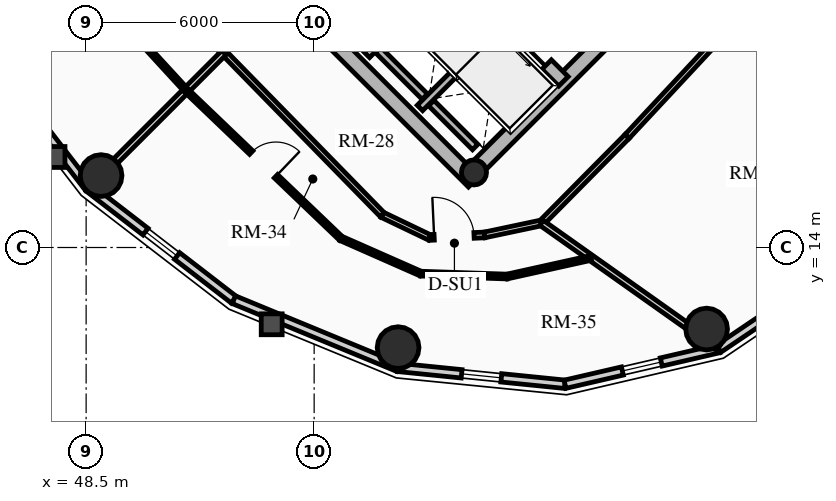
"""IFC4 building model, lengths in metres.
Left out: names, types, materials, properties, quantities, classifications, styles, units other than length and angle.
Written with IfcOpenShell. Run it as: python <this file> out.ifc"""

import sys

from ifc_helpers import new_model, si_unit, direction, frame, frame_2d, origin, origin_2d, place, context, subcontext, project, spatial, rectangle, circle, hollow_circle, extrude, source, transform, mapped, element, fill, save


model = new_model("IFC4")
c1 = context("Model", 3, precision=1e-05, world=origin(), true_north=direction((0.0, 1.0)))
c2 = subcontext(c1, "Body", "Model", "MODEL_VIEW")
j1 = project(units=[si_unit("LENGTHUNIT", "METRE"), si_unit("PLANEANGLEUNIT", "RADIAN")], contexts=[c1])
p1 = place(None, origin())
s1 = spatial("IfcSite", under=j1, at=p1, CompositionType="ELEMENT")
p2 = place(p1, origin())
s2 = spatial("IfcBuilding", under=s1, at=p2, CompositionType="ELEMENT")
p3 = place(p2, frame((0.0, 0.0, 222.85)))
s3 = spatial("IfcBuildingStorey", under=s2, at=p3, CompositionType="ELEMENT", Elevation=222.85)
p4 = place(p3, frame((58.702, 15.732, 0.0), z_axis=(0.0, 0.0, 1.0), x_axis=(-0.707106781187, 0.707106781187, 0.0)))
e1 = element("IfcWall", 1, at=p4, inside=s3, PredefinedType="SHEAR", context=c2, shape_type="SweptSolid", body=[
    extrude(rectangle(XDim=14.1, YDim=0.4, at=frame_2d((7.05, 0.0))), origin(), (0.0, 0.0, 1.0), 3.2),
])
p5 = place(p3, frame((58.561, 15.873, 0.0), z_axis=(0.0, 0.0, 1.0), x_axis=(0.707106781187, 0.707106781187, 0.0)))
e2 = element("IfcWall", 2, at=p5, inside=s3, PredefinedType="SHEAR", context=c2, shape_type="SweptSolid", body=[
    extrude(rectangle(XDim=10.7, YDim=0.4, at=frame_2d((5.35, 0.0))), origin(), (0.0, 0.0, 1.0), 3.2),
])
m1 = source(origin(), c2, "Body", "SweptSolid", [
    extrude(rectangle(XDim=1.5, YDim=2.02, at=frame_2d((0.75, 1.01))), frame((0.0, 0.21, 0.0), z_axis=(0.0, -1.0, 0.0), x_axis=(1.0, 0.0, 0.0)), (0.0, 0.0, 1.0), 0.42),
])
p6 = place(p5, frame((5.45, 0.0, 0.0)))
e3 = element("IfcOpeningElement", 3, at=p6, cuts=e2, PredefinedType="OPENING", context=c2, shape_type="MappedRepresentation", body=[
    mapped(m1, transform((0.0, 0.0, 0.0), x_axis=(1.0, 0.0, 0.0), y_axis=(0.0, 1.0, 0.0), z_axis=(0.0, 0.0, 1.0), scale=1.0)),
])
p7 = place(p3, frame((61.06, 18.373, 0.0), z_axis=(0.0, 0.0, 1.0), x_axis=(-0.707106781187, 0.707106781187, 0.0)))
e4 = element("IfcWall", 4, at=p7, inside=s3, PredefinedType="SHEAR", context=c2, shape_type="SweptSolid", body=[
    extrude(rectangle(XDim=13.7, YDim=0.35, at=frame_2d((6.85, 0.0))), origin(), (0.0, 0.0, 1.0), 3.2),
])
m2 = source(origin(), c2, "Body", "SweptSolid", [
    extrude(rectangle(XDim=1.1, YDim=2.015, at=frame_2d((0.55, 1.007))), frame((0.0, 0.185, 0.0), z_axis=(0.0, -1.0, 0.0), x_axis=(1.0, 0.0, 0.0)), (0.0, 0.0, 1.0), 0.37),
])
p8 = place(p7, frame((4.85, 0.0, 0.0)))
e5 = element("IfcOpeningElement", 5, at=p8, cuts=e4, PredefinedType="OPENING", context=c2, shape_type="MappedRepresentation", body=[
    mapped(m2, transform((0.0, 0.0, 0.0), x_axis=(1.0, 0.0, 0.0), y_axis=(0.0, 1.0, 0.0), z_axis=(0.0, 0.0, 1.0), scale=1.0)),
])
p9 = place(p7, frame((0.625, 0.0, 0.0)))
e6 = element("IfcOpeningElement", 6, at=p9, cuts=e4, PredefinedType="OPENING", context=c2, shape_type="MappedRepresentation", body=[
    mapped(m2, transform((0.0, 0.0, 0.0), x_axis=(1.0, 0.0, 0.0), y_axis=(0.0, 1.0, 0.0), z_axis=(0.0, 0.0, 1.0), scale=1.0)),
])
p10 = place(p7, frame((2.625, 0.0, 0.0)))
e7 = element("IfcOpeningElement", 7, at=p10, cuts=e4, PredefinedType="OPENING", context=c2, shape_type="MappedRepresentation", body=[
    mapped(m2, transform((0.0, 0.0, 0.0), x_axis=(1.0, 0.0, 0.0), y_axis=(0.0, 1.0, 0.0), z_axis=(0.0, 0.0, 1.0), scale=1.0)),
])
m3 = source(origin(), c2, "Body", "SweptSolid", [
    extrude(rectangle(XDim=1.15, YDim=2.02, at=frame_2d((0.575, 1.01))), frame((0.0, 0.185, 0.0), z_axis=(0.0, -1.0, 0.0), x_axis=(1.0, 0.0, 0.0)), (0.0, 0.0, 1.0), 0.37),
])
p11 = place(p7, frame((7.27, 0.0, 0.0)))
e8 = element("IfcOpeningElement", 8, at=p11, cuts=e4, PredefinedType="OPENING", context=c2, shape_type="MappedRepresentation", body=[
    mapped(m3, transform((0.0, 0.0, 0.0), x_axis=(1.0, 0.0, 0.0), y_axis=(0.0, 1.0, 0.0), z_axis=(0.0, 0.0, 1.0), scale=1.0)),
])
p12 = place(p3, frame((58.706, 15.976, 0.0), z_axis=(0.0, 0.0, 1.0), x_axis=(0.707106781187, 0.707106781187, 0.0)))
e9 = element("IfcColumn", 9, at=p12, inside=s3, PredefinedType="COLUMN", context=c2, shape_type="SweptSolid", body=[
    extrude(hollow_circle(Radius=0.33, WallThickness=0.025, at=origin_2d()), origin(), (0.0, 0.0, 1.0), 3.2),
])
for number, where, z_axis, x_axis in (
    (10, (48.893, 15.893, 0.0), (0.0, 0.0, 1.0), (1.0, 0.0, 0.0)),
    (11, (56.709, 11.365, 0.0), (0.0, 0.0, 1.0), (1.0, 0.0, 0.0)),
    (12, (64.827, 11.854, 0.0), (0.0, 0.0, 1.0), (1.0, 0.0, 0.0)),
):
    element("IfcColumn", number, at=place(p3, frame(where, z_axis=z_axis, x_axis=x_axis)), inside=s3, PredefinedType="USERDEFINED", context=c2, shape_type="SweptSolid", body=[
        extrude(circle(Radius=0.55, at=origin_2d()), origin(), (0.0, 0.0, 1.0), 3.2),
    ])
p13 = place(p3, frame((48.569, 15.569, 0.0), z_axis=(0.0, 0.0, 1.0), x_axis=(-0.610523083886, 0.791998462147, 0.0)))
e13 = element("IfcWall", 13, at=p13, inside=s3, PredefinedType="SOLIDWALL", context=c2, shape_type="SweptSolid", body=[
    extrude(rectangle(XDim=4.82, YDim=0.22, at=frame_2d((2.41, 0.0))), origin(), (0.0, 0.0, 1.0), 2.612),
])
p14 = place(p3, frame((52.387, 12.626, 0.0), z_axis=(0.0, 0.0, 1.0), x_axis=(-0.791998462147, 0.610523083886, 0.0)))
e14 = element("IfcWall", 14, at=p14, inside=s3, PredefinedType="SOLIDWALL", context=c2, shape_type="SweptSolid", body=[
    extrude(rectangle(XDim=4.82, YDim=0.22, at=frame_2d((2.41, 0.0))), origin(), (0.0, 0.0, 1.0), 2.612),
])
m4 = source(origin(), c2, "Body", "SweptSolid", [
    extrude(rectangle(XDim=1.05, YDim=1.3, at=frame_2d((0.525, 0.65))), frame((0.0, 0.12, 0.0), z_axis=(0.0, -1.0, 0.0), x_axis=(1.0, 0.0, 0.0)), (0.0, 0.0, 1.0), 0.24),
])
p15 = place(p14, frame((1.885, 0.0, 0.65)))
e15 = element("IfcOpeningElement", 15, at=p15, cuts=e14, PredefinedType="OPENING", context=c2, shape_type="MappedRepresentation", body=[
    mapped(m4, transform((0.0, 0.0, 0.0), x_axis=(1.0, 0.0, 0.0), y_axis=(0.0, 1.0, 0.0), z_axis=(0.0, 0.0, 1.0), scale=1.0)),
])
p16 = place(p3, frame((56.705, 10.845, 0.0), z_axis=(0.0, 0.0, 1.0), x_axis=(-0.924447353237, 0.381309704956, 0.0)))
e16 = element("IfcWall", 16, at=p16, inside=s3, PredefinedType="SOLIDWALL", context=c2, shape_type="SweptSolid", body=[
    extrude(rectangle(XDim=4.671, YDim=0.22, at=frame_2d((2.335, 0.0))), origin(), (0.0, 0.0, 1.0), 2.612),
])
p17 = place(p3, frame((61.1, 10.401, 0.0), z_axis=(0.0, 0.0, 1.0), x_axis=(-0.994929930991, 0.100570534541, 0.0)))
e17 = element("IfcWall", 17, at=p17, inside=s3, PredefinedType="SOLIDWALL", context=c2, shape_type="SweptSolid", body=[
    extrude(rectangle(XDim=4.418, YDim=0.22, at=frame_2d((2.209, 0.0))), origin(), (0.0, 0.0, 1.0), 2.612),
])
p18 = place(p17, frame((1.684, 0.0, 0.65)))
e18 = element("IfcOpeningElement", 18, at=p18, cuts=e17, PredefinedType="OPENING", context=c2, shape_type="MappedRepresentation", body=[
    mapped(m4, transform((0.0, 0.0, 0.0), x_axis=(1.0, 0.0, 0.0), y_axis=(0.0, 1.0, 0.0), z_axis=(0.0, 0.0, 1.0), scale=1.0)),
])
p19 = place(p3, frame((65.144, 11.337, 0.0), z_axis=(0.0, 0.0, 1.0), x_axis=(-0.974249228678, -0.225473813158, 0.0)))
e19 = element("IfcWall", 19, at=p19, inside=s3, PredefinedType="SOLIDWALL", context=c2, shape_type="SweptSolid", body=[
    extrude(rectangle(XDim=4.15, YDim=0.22, at=frame_2d((2.075, 0.0))), origin(), (0.0, 0.0, 1.0), 2.612),
])
p20 = place(p19, frame((1.55, 0.0, 0.65)))
e20 = element("IfcOpeningElement", 20, at=p20, cuts=e19, PredefinedType="OPENING", context=c2, shape_type="MappedRepresentation", body=[
    mapped(m4, transform((0.0, 0.0, 0.0), x_axis=(1.0, 0.0, 0.0), y_axis=(0.0, 1.0, 0.0), z_axis=(0.0, 0.0, 1.0), scale=1.0)),
])
p21 = place(p3, frame((68.439, 13.561, 0.0), z_axis=(0.0, 0.0, 1.0), x_axis=(-0.828833723692, -0.559495003079, 0.0)))
e21 = element("IfcWall", 21, at=p21, inside=s3, PredefinedType="SOLIDWALL", context=c2, shape_type="SweptSolid", body=[
    extrude(rectangle(XDim=3.976, YDim=0.22, at=frame_2d((1.988, 0.0))), origin(), (0.0, 0.0, 1.0), 2.612),
])
p22 = place(p3, frame((55.888, 19.069, 0.0), z_axis=(0.0, 0.0, 1.0), x_axis=(0.707106781187, 0.707106781187, 0.0)))
e22 = element("IfcWall", 22, at=p22, inside=s3, PredefinedType="SHEAR", context=c2, shape_type="SweptSolid", body=[
    extrude(rectangle(XDim=2.97, YDim=0.2, at=frame_2d((1.485, 0.0))), origin(), (0.0, 0.0, 1.0), 3.2),
])
p23 = place(p3, frame((57.284, 17.673, 0.0), z_axis=(0.0, 0.0, 1.0), x_axis=(0.707147878904, 0.70706568108, 0.0)))
e23 = element("IfcWall", 23, at=p23, inside=s3, PredefinedType="SHEAR", context=c2, shape_type="SweptSolid", body=[
    extrude(rectangle(XDim=2.97, YDim=0.2, at=frame_2d((1.485, 0.0))), origin(), (0.0, 0.0, 1.0), 3.2),
])
p24 = place(p3, frame((57.412, 17.97, 0.0), z_axis=(0.0, 0.0, 1.0), x_axis=(-0.707106781187, 0.707106781187, 0.0)))
e24 = element("IfcWall", 24, at=p24, inside=s3, PredefinedType="SHEAR", context=c2, shape_type="SweptSolid", body=[
    extrude(rectangle(XDim=1.735, YDim=0.2, at=frame_2d((0.867, 0.0))), origin(), (0.0, 0.0, 1.0), 3.2),
])
p25 = place(p3, frame((58.737, 16.644, 0.0), z_axis=(0.0, 0.0, 1.0), x_axis=(-0.707032117043, 0.707181437447, 0.0)))
e25 = element("IfcWall", 25, at=p25, inside=s3, PredefinedType="SHEAR", context=c2, shape_type="SweptSolid", body=[
    extrude(rectangle(XDim=1.635, YDim=0.2, at=frame_2d((0.817, 0.0))), origin(), (0.0, 0.0, 1.0), 3.2),
])
p26 = place(p3, frame((48.052, 23.323, 0.0), z_axis=(0.0, 0.0, 1.0), x_axis=(0.696573981306, -0.717484974454, 0.0)))
e26 = element("IfcWall", 26, at=p26, inside=s3, PredefinedType="PARTITIONING", context=c2, shape_type="SweptSolid", body=[
    extrude(rectangle(XDim=5.849, YDim=0.15, at=frame_2d((2.925, 0.0))), origin(), (0.0, 0.0, 1.0), 2.975),
])
p27 = place(p3, frame((52.126, 19.126, 0.0), z_axis=(0.0, 0.0, 1.0), x_axis=(0.698979087027, -0.715142108884, 0.0)))
e27 = element("IfcWall", 27, at=p27, inside=s3, PredefinedType="PARTITIONING", context=c2, shape_type="SweptSolid", body=[
    extrude(rectangle(XDim=5.966, YDim=0.15, at=frame_2d((2.983, 0.0))), origin(), (0.0, 0.0, 1.0), 2.612),
])
p28 = place(p3, frame((56.296, 14.859, 0.0), z_axis=(0.0, 0.0, 1.0), x_axis=(0.90178292445, -0.432189260823, 0.0)))
e28 = element("IfcWall", 28, at=p28, inside=s3, PredefinedType="PARTITIONING", context=c2, shape_type="SweptSolid", body=[
    extrude(rectangle(XDim=1.377, YDim=0.15, at=frame_2d((0.688, 0.0))), origin(), (0.0, 0.0, 1.0), 2.545),
])
p29 = place(p3, frame((57.538, 14.264, 0.0), z_axis=(0.0, 0.0, 1.0), x_axis=(0.99892990172, 0.046249880546, 0.0)))
e29 = element("IfcWall", 29, at=p29, inside=s3, PredefinedType="PARTITIONING", context=c2, shape_type="SweptSolid", body=[
    extrude(rectangle(XDim=1.446, YDim=0.15, at=frame_2d((0.723, 0.0))), origin(), (0.0, 0.0, 1.0), 2.612),
])
m5 = source(origin(), c2, "Body", "SweptSolid", [
    extrude(rectangle(XDim=1.05, YDim=2.015, at=frame_2d((0.525, 1.007))), frame((0.0, 0.085, 0.0), z_axis=(0.0, -1.0, 0.0), x_axis=(1.0, 0.0, 0.0)), (0.0, 0.0, 1.0), 0.17),
])
p30 = place(p29, frame((0.12, 0.0, 0.0)))
e30 = element("IfcOpeningElement", 30, at=p30, cuts=e29, PredefinedType="OPENING", context=c2, shape_type="MappedRepresentation", body=[
    mapped(m5, transform((0.0, 0.0, 0.0), x_axis=(1.0, 0.0, 0.0), y_axis=(0.0, 1.0, 0.0), z_axis=(0.0, 0.0, 1.0), scale=1.0)),
])
p31 = place(p3, frame((58.983, 14.331, 0.0), z_axis=(0.0, 0.0, 1.0), x_axis=(0.978328007546, 0.207061125397, 0.0)))
e31 = element("IfcWall", 31, at=p31, inside=s3, PredefinedType="PARTITIONING", context=c2, shape_type="SweptSolid", body=[
    extrude(rectangle(XDim=1.534, YDim=0.15, at=frame_2d((0.767, 0.0))), origin(), (0.0, 0.0, 1.0), 2.545),
])
p32 = place(p3, frame((60.484, 14.648, 0.0), z_axis=(0.0, 0.0, 1.0), x_axis=(0.703398221944, 0.710795991383, 0.0)))
e32 = element("IfcWall", 32, at=p32, inside=s3, PredefinedType="PARTITIONING", context=c2, shape_type="SweptSolid", body=[
    extrude(rectangle(XDim=3.201, YDim=0.15, at=frame_2d((1.601, 0.0))), origin(), (0.0, 0.0, 1.0), 2.612),
])
p33 = place(p3, frame((62.736, 16.924, 0.0), z_axis=(0.0, 0.0, 1.0), x_axis=(0.681946700833, 0.731401871219, 0.0)))
e33 = element("IfcWall", 33, at=p33, inside=s3, PredefinedType="PARTITIONING", context=c2, shape_type="SweptSolid", body=[
    extrude(rectangle(XDim=6.393, YDim=0.15, at=frame_2d((3.196, 0.0))), origin(), (0.0, 0.0, 1.0), 2.545),
])
p34 = place(p3, frame((52.126, 19.126, 0.0), z_axis=(0.0, 0.0, 1.0), x_axis=(-0.707106781187, -0.707106781187, 0.0)))
e34 = element("IfcWall", 34, at=p34, inside=s3, PredefinedType="PARTITIONING", context=c2, shape_type="SweptSolid", body=[
    extrude(rectangle(XDim=5.01, YDim=0.16, at=frame_2d((2.505, 0.0))), origin(), (0.0, 0.0, 1.0), 2.612),
])
p35 = place(p3, frame((60.484, 14.648, 0.0), z_axis=(0.0, 0.0, 1.0), x_axis=(0.81605983932, -0.577967420058, 0.0)))
e35 = element("IfcWall", 35, at=p35, inside=s3, PredefinedType="PARTITIONING", context=c2, shape_type="SweptSolid", body=[
    extrude(rectangle(XDim=5.699, YDim=0.16, at=frame_2d((2.85, 0.0))), origin(), (0.0, 0.0, 1.0), 2.612),
])
p36 = place(p3, frame((47.377, 22.223, 0.0), z_axis=(0.0, 0.0, 1.0), x_axis=(0.676554417653, -0.736392639802, 0.0)))
e36 = element("IfcWall", 36, at=p36, inside=s3, PredefinedType="PARTITIONING", context=c2, shape_type="SweptSolid", body=[
    extrude(rectangle(XDim=5.553, YDim=0.125, at=frame_2d((2.776, 0.0))), origin(), (0.0, 0.0, 1.0), 2.975),
])
m6 = source(origin(), c2, "Body", "SweptSolid", [
    extrude(rectangle(XDim=0.9, YDim=2.005, at=frame_2d((0.45, 1.002))), frame((0.0, 0.073, 0.0), z_axis=(0.0, -1.0, 0.0), x_axis=(1.0, 0.0, 0.0)), (0.0, 0.0, 1.0), 0.145),
])
p37 = place(p36, frame((2.326, 0.0, 0.0)))
e37 = element("IfcOpeningElement", 37, at=p37, cuts=e36, PredefinedType="OPENING", context=c2, shape_type="MappedRepresentation", body=[
    mapped(m6, transform((0.0, 0.0, 0.0), x_axis=(1.0, 0.0, 0.0), y_axis=(0.0, 1.0, 0.0), z_axis=(0.0, 0.0, 1.0), scale=1.0)),
])
p38 = place(p3, frame((51.134, 18.134, 0.0), z_axis=(0.0, 0.0, 1.0), x_axis=(0.722450775654, -0.691422357721, 0.0)))
e38 = element("IfcWall", 38, at=p38, inside=s3, PredefinedType="PARTITIONING", context=c2, shape_type="SweptSolid", body=[
    extrude(rectangle(XDim=5.634, YDim=0.125, at=frame_2d((2.817, 0.0))), origin(), (0.0, 0.0, 1.0), 2.612),
])
p39 = place(p38, frame((2.367, 0.0, 0.0)))
e39 = element("IfcOpeningElement", 39, at=p39, cuts=e38, PredefinedType="OPENING", context=c2, shape_type="MappedRepresentation", body=[
    mapped(m6, transform((0.0, 0.0, 0.0), x_axis=(1.0, 0.0, 0.0), y_axis=(0.0, 1.0, 0.0), z_axis=(0.0, 0.0, 1.0), scale=1.0)),
])
p40 = place(p3, frame((55.204, 14.239, 0.0), z_axis=(0.0, 0.0, 1.0), x_axis=(0.914999746908, -0.403454412738, 0.0)))
e40 = element("IfcWall", 40, at=p40, inside=s3, PredefinedType="PARTITIONING", context=c2, shape_type="SweptSolid", body=[
    extrude(rectangle(XDim=2.297, YDim=0.125, at=frame_2d((1.148, 0.0))), origin(), (0.0, 0.0, 1.0), 2.545),
])
p41 = place(p3, frame((57.306, 13.312, 0.0), z_axis=(0.0, 0.0, 1.0), x_axis=(0.999437122872, -0.033547539789, 0.0)))
e41 = element("IfcWall", 41, at=p41, inside=s3, PredefinedType="PARTITIONING", context=c2, shape_type="SweptSolid", body=[
    extrude(rectangle(XDim=2.271, YDim=0.125, at=frame_2d((1.135, 0.0))), origin(), (0.0, 0.0, 1.0), 2.612),
])
p42 = place(p3, frame((59.575, 13.236, 0.0), z_axis=(0.0, 0.0, 1.0), x_axis=(0.97628336492, 0.216496631337, 0.0)))
e42 = element("IfcWall", 42, at=p42, inside=s3, PredefinedType="PARTITIONING", context=c2, shape_type="SweptSolid", body=[
    extrude(rectangle(XDim=2.264, YDim=0.125, at=frame_2d((1.132, 0.0))), origin(), (0.0, 0.0, 1.0), 2.545),
])
m7 = source(origin(), c2, "Body", "SweptSolid", [
    extrude(rectangle(XDim=1.05, YDim=1.3, at=frame_2d((0.525, 0.65))), frame((0.0, 0.03, 0.0), z_axis=(0.0, -1.0, 0.0), x_axis=(1.0, 0.0, 0.0)), (0.0, 0.0, 1.0), 0.06),
])
p43 = place(p15, origin())
e43 = element("IfcWindow", 43, at=p43, inside=s3, PartitioningType="SINGLE_PANEL", PredefinedType="WINDOW", context=c2, shape_type="MappedRepresentation", body=[
    mapped(m7, transform((0.0, 0.0, 0.0), x_axis=(1.0, 0.0, 0.0), y_axis=(0.0, 1.0, 0.0), z_axis=(0.0, 0.0, 1.0), scale=1.0)),
])
fill(e15, e43)
p44 = place(p18, origin())
e44 = element("IfcWindow", 44, at=p44, inside=s3, PartitioningType="SINGLE_PANEL", PredefinedType="WINDOW", context=c2, shape_type="MappedRepresentation", body=[
    mapped(m7, transform((0.0, 0.0, 0.0), x_axis=(1.0, 0.0, 0.0), y_axis=(0.0, 1.0, 0.0), z_axis=(0.0, 0.0, 1.0), scale=1.0)),
])
fill(e18, e44)
p45 = place(p20, origin())
e45 = element("IfcWindow", 45, at=p45, inside=s3, PartitioningType="SINGLE_PANEL", PredefinedType="WINDOW", context=c2, shape_type="MappedRepresentation", body=[
    mapped(m7, transform((0.0, 0.0, 0.0), x_axis=(1.0, 0.0, 0.0), y_axis=(0.0, 1.0, 0.0), z_axis=(0.0, 0.0, 1.0), scale=1.0)),
])
fill(e20, e45)
m8 = source(origin(), c2, "Body", "SweptSolid", [
    extrude(rectangle(XDim=1.1, YDim=2.015, at=frame_2d((0.55, 1.007))), frame((0.0, 0.025, 0.0), z_axis=(0.0, -1.0, 0.0), x_axis=(1.0, 0.0, 0.0)), (0.0, 0.0, 1.0), 0.05),
])
p46 = place(p9, origin())
e46 = element("IfcDoor", 46, at=p46, inside=s3, OperationType="SLIDING_TO_LEFT", PredefinedType="DOOR", context=c2, shape_type="MappedRepresentation", body=[
    mapped(m8, transform((0.0, 0.0, 0.0), x_axis=(1.0, 0.0, 0.0), y_axis=(0.0, 1.0, 0.0), z_axis=(0.0, 0.0, 1.0), scale=1.0)),
])
fill(e6, e46)
m9 = source(origin(), c2, "Body", "SweptSolid", [
    extrude(rectangle(XDim=1.05, YDim=2.015, at=frame_2d((0.525, 1.007))), frame((0.0, 0.025, 0.0), z_axis=(0.0, -1.0, 0.0), x_axis=(1.0, 0.0, 0.0)), (0.0, 0.0, 1.0), 0.05),
])
p47 = place(p30, origin())
e47 = element("IfcDoor", 47, at=p47, inside=s3, OperationType="SINGLE_SWING_LEFT", PredefinedType="DOOR", context=c2, shape_type="MappedRepresentation", body=[
    mapped(m9, transform((0.0, 0.0, 0.0), x_axis=(1.0, 0.0, 0.0), y_axis=(0.0, 1.0, 0.0), z_axis=(0.0, 0.0, 1.0), scale=1.0)),
])
fill(e30, e47)
m10 = source(origin(), c2, "Body", "SweptSolid", [
    extrude(rectangle(XDim=0.9, YDim=2.005, at=frame_2d((0.45, 1.002))), frame((0.0, 0.025, 0.0), z_axis=(0.0, -1.0, 0.0), x_axis=(1.0, 0.0, 0.0)), (0.0, 0.0, 1.0), 0.05),
])
p48 = place(p39, origin())
e48 = element("IfcDoor", 48, at=p48, inside=s3, OperationType="SINGLE_SWING_RIGHT", PredefinedType="DOOR", context=c2, shape_type="MappedRepresentation", body=[
    mapped(m10, transform((0.0, 0.0, 0.0), x_axis=(1.0, 0.0, 0.0), y_axis=(0.0, 1.0, 0.0), z_axis=(0.0, 0.0, 1.0), scale=1.0)),
])
fill(e39, e48)
save(model, sys.argv[1])
